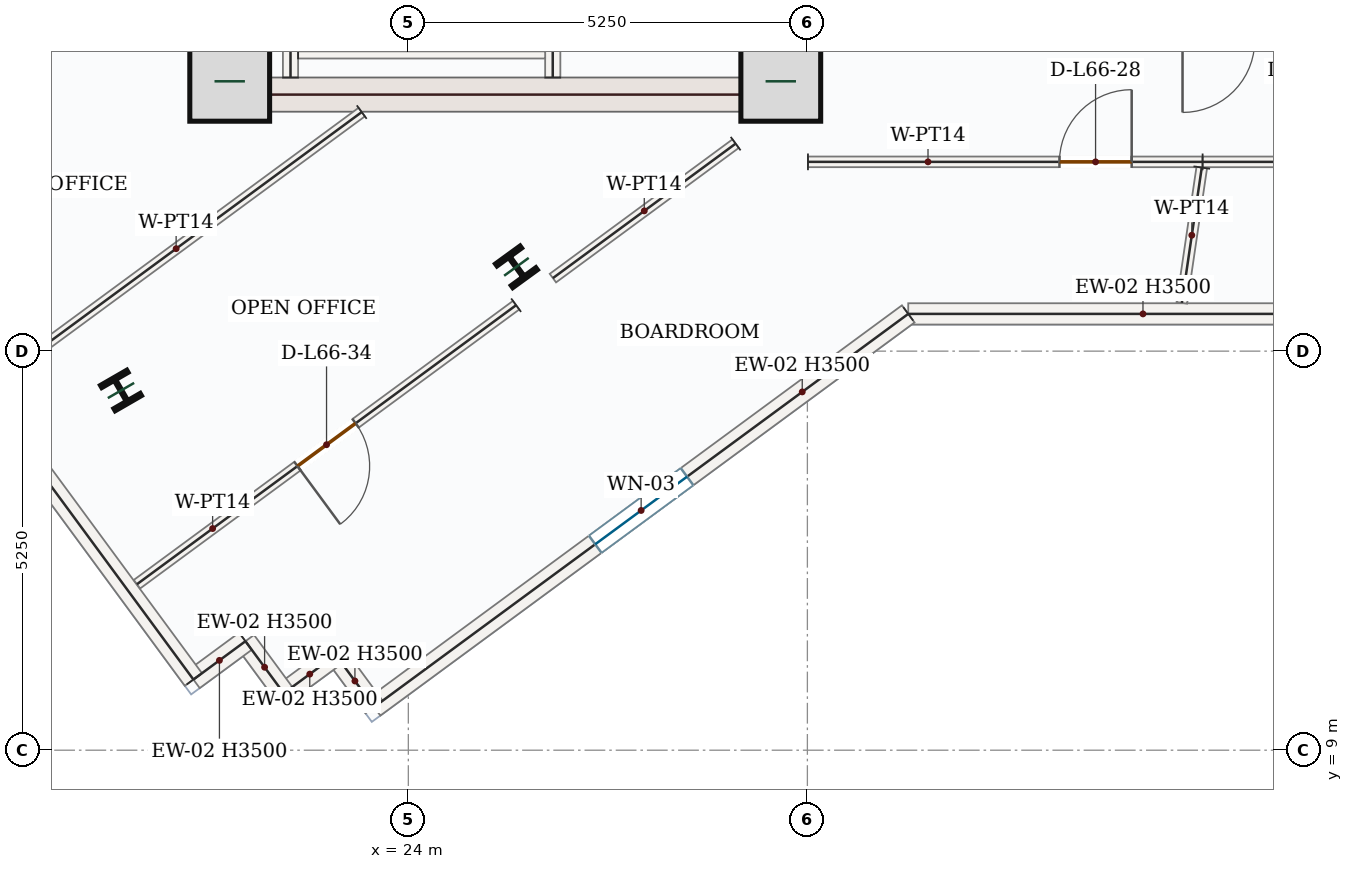
"""IFC4 building model, lengths in metres.
Left out: names, types, materials, properties, quantities, classifications, styles, units other than length and angle.
Written with IfcOpenShell. Run it as: python <this file> out.ifc"""

import sys

from ifc_helpers import new_model, si_unit, direction, frame, frame_2d, origin, origin_2d, place, context, subcontext, project, spatial, rectangle, i_section, extrude, source, transform, mapped, element, fill, save


model = new_model("IFC4")
c1 = context("Model", 3, precision=1e-05, world=origin(), true_north=direction((0.0, 1.0)))
c2 = subcontext(c1, "Body", "Model", "MODEL_VIEW")
j1 = project(units=[si_unit("LENGTHUNIT", "METRE"), si_unit("PLANEANGLEUNIT", "RADIAN")], contexts=[c1])
p1 = place(None, origin())
s1 = spatial("IfcSite", under=j1, at=p1, CompositionType="ELEMENT")
p2 = place(p1, origin())
s2 = spatial("IfcBuilding", under=s1, at=p2, CompositionType="ELEMENT")
p3 = place(p2, frame((0.0, 0.0, 276.6)))
s3 = spatial("IfcBuildingStorey", under=s2, at=p3, CompositionType="ELEMENT", Elevation=276.6)
m1 = source(origin(), c2, "Body", "SweptSolid", [
    extrude(rectangle(XDim=8.55, YDim=0.45, at=frame_2d((4.275, 0.0))), origin(), (0.0, 0.0, 1.0), 3.5),
])
p4 = place(p3, frame((21.475, 17.4, 0.0), z_axis=(0.0, 0.0, 1.0), x_axis=(0.0, 1.0, 0.0)))
e1 = element("IfcWall", 1, at=p4, inside=s3, PredefinedType="SHEAR", context=c2, shape_type="MappedRepresentation", body=[
    mapped(m1, transform((0.0, 0.0, 0.0), x_axis=(1.0, 0.0, 0.0), y_axis=(0.0, 1.0, 0.0), z_axis=(0.0, 0.0, 1.0), scale=1.0)),
])
p5 = place(p3, frame((29.025, 17.4, 0.0), z_axis=(0.0, 0.0, 1.0), x_axis=(0.0, 1.0, 0.0)))
e2 = element("IfcWall", 2, at=p5, inside=s3, PredefinedType="SHEAR", context=c2, shape_type="SweptSolid", body=[
    extrude(rectangle(XDim=8.55, YDim=0.45, at=frame_2d((4.275, 0.0))), origin(), (0.0, 0.0, 1.0), 3.5),
])
p6 = place(p5, frame((6.65, 0.0, 0.0)))
e3 = element("IfcOpeningElement", 3, at=p6, cuts=e2, PredefinedType="OPENING", context=c2, shape_type="SweptSolid", body=[
    extrude(rectangle(XDim=1.1, YDim=2.2, at=frame_2d((0.55, 1.1))), frame((0.0, 0.235, 0.0), z_axis=(0.0, -1.0, 0.0), x_axis=(1.0, 0.0, 0.0)), (0.0, 0.0, 1.0), 0.47),
])
p7 = place(p5, frame((2.7, 0.0, 0.0)))
e4 = element("IfcOpeningElement", 4, at=p7, cuts=e2, PredefinedType="OPENING", context=c2, shape_type="SweptSolid", body=[
    extrude(rectangle(XDim=0.88, YDim=2.1, at=frame_2d((0.44, 1.05))), frame((0.0, 0.235, 0.0), z_axis=(0.0, -1.0, 0.0), x_axis=(1.0, 0.0, 0.0)), (0.0, 0.0, 1.0), 0.47),
])
p8 = place(p5, frame((4.6, 0.0, 0.0)))
e5 = element("IfcOpeningElement", 5, at=p8, cuts=e2, PredefinedType="OPENING", context=c2, shape_type="SweptSolid", body=[
    extrude(rectangle(XDim=0.88, YDim=2.1, at=frame_2d((0.44, 1.05))), frame((0.0, 0.235, 0.0), z_axis=(0.0, -1.0, 0.0), x_axis=(1.0, 0.0, 0.0)), (0.0, 0.0, 1.0), 0.47),
])
m2 = source(origin(), c2, "Body", "SweptSolid", [
    extrude(rectangle(XDim=7.1, YDim=0.45, at=frame_2d((3.55, 0.0))), origin(), (0.0, 0.0, 1.0), 3.5),
])
p9 = place(p3, frame((21.7, 17.625, 0.0), z_axis=(0.0, 0.0, 1.0), x_axis=(1.0, 0.0, 0.0)))
e6 = element("IfcWall", 6, at=p9, inside=s3, PredefinedType="SHEAR", context=c2, shape_type="MappedRepresentation", body=[
    mapped(m2, transform((0.0, 0.0, 0.0), x_axis=(1.0, 0.0, 0.0), y_axis=(0.0, 1.0, 0.0), z_axis=(0.0, 0.0, 1.0), scale=1.0)),
])
m3 = source(origin(), c2, "Body", "SweptSolid", [
    extrude(rectangle(XDim=1.05, YDim=1.05, at=origin_2d()), origin(), (0.0, 0.0, 1.0), 3.75),
])
for number, where, z_axis, x_axis in (
    (7, (21.65, 17.8, 0.0), (0.0, 0.0, 1.0), (1.0, 0.0, 0.0)),
    (8, (28.9, 17.8, 0.0), (0.0, 0.0, 1.0), (1.0, 0.0, 0.0)),
):
    element("IfcColumn", number, at=place(p3, frame(where, z_axis=z_axis, x_axis=x_axis)), inside=s3, PredefinedType="COLUMN", context=c2, shape_type="MappedRepresentation", body=[
        mapped(m3, transform((0.0, 0.0, 0.0), x_axis=(1.0, 0.0, 0.0), y_axis=(0.0, 1.0, 0.0), z_axis=(0.0, 0.0, 1.0), scale=1.0)),
    ])
m4 = source(origin(), c2, "Body", "SweptSolid", [
    extrude(i_section(OverallWidth=0.399, OverallDepth=0.386, WebThickness=0.021, FlangeThickness=0.033, FilletRadius=0.018, at=origin_2d()), origin(), (0.0, 0.0, 1.0), 3.75),
])
for number, where, z_axis, x_axis in (
    (9, (25.422, 15.359, 0.0), (0.0, 0.0, 1.0), (0.809, 0.588, 0.0)),
    (10, (20.22, 13.732, 0.0), (0.0, 0.0, 1.0), (0.866, 0.5, 0.0)),
):
    element("IfcColumn", number, at=place(p3, frame(where, z_axis=z_axis, x_axis=x_axis)), inside=s3, PredefinedType="COLUMN", context=c2, shape_type="MappedRepresentation", body=[
        mapped(m4, transform((0.0, 0.0, 0.0), x_axis=(1.0, 0.0, 0.0), y_axis=(0.0, 1.0, 0.0), z_axis=(0.0, 0.0, 1.0), scale=1.0)),
    ])
m5 = source(origin(), c2, "Body", "SweptSolid", [
    extrude(rectangle(XDim=6.177, YDim=0.28, at=frame_2d((3.088, 0.0))), origin(), (0.0, 0.0, 1.0), 3.5),
])
p10 = place(p3, frame((36.753, 14.74, 0.0), z_axis=(0.0, 0.0, 1.0), x_axis=(-1.0, 0.0, 0.0)))
e11 = element("IfcWall", 11, at=p10, inside=s3, PredefinedType="SOLIDWALL", context=c2, shape_type="MappedRepresentation", body=[
    mapped(m5, transform((0.0, 0.0, 0.0), x_axis=(1.0, 0.0, 0.0), y_axis=(0.0, 1.0, 0.0), z_axis=(0.0, 0.0, 1.0), scale=1.0)),
])
p11 = place(p3, frame((30.577, 14.74, 0.0), z_axis=(0.0, 0.0, 1.0), x_axis=(-0.805403112922, -0.592727446383, 0.0)))
e12 = element("IfcWall", 12, at=p11, inside=s3, PredefinedType="SOLIDWALL", context=c2, shape_type="SweptSolid", body=[
    extrude(rectangle(XDim=8.726, YDim=0.28, at=frame_2d((4.363, 0.0))), origin(), (0.0, 0.0, 1.0), 3.5),
])
p12 = place(p11, frame((3.613, 0.0, 0.85)))
e13 = element("IfcOpeningElement", 13, at=p12, cuts=e12, PredefinedType="OPENING", context=c2, shape_type="SweptSolid", body=[
    extrude(rectangle(XDim=1.5, YDim=1.5, at=frame_2d((0.75, 0.75))), frame((0.0, 0.15, 0.0), z_axis=(0.0, -1.0, 0.0), x_axis=(1.0, 0.0, 0.0)), (0.0, 0.0, 1.0), 0.3),
])
m6 = source(origin(), c2, "Body", "SweptSolid", [
    extrude(rectangle(XDim=0.85, YDim=0.28, at=frame_2d((0.425, 0.0))), origin(), (0.0, 0.0, 1.0), 3.5),
])
p13 = place(p3, frame((23.549, 9.568, 0.0), z_axis=(0.0, 0.0, 1.0), x_axis=(-0.592807079659, 0.80534450163, 0.0)))
e14 = element("IfcWall", 14, at=p13, inside=s3, PredefinedType="SOLIDWALL", context=c2, shape_type="MappedRepresentation", body=[
    mapped(m6, transform((0.0, 0.0, 0.0), x_axis=(1.0, 0.0, 0.0), y_axis=(0.0, 1.0, 0.0), z_axis=(0.0, 0.0, 1.0), scale=1.0)),
])
m7 = source(origin(), c2, "Body", "SweptSolid", [
    extrude(rectangle(XDim=0.85, YDim=0.28, at=frame_2d((0.425, 0.0))), origin(), (0.0, 0.0, 1.0), 3.5),
])
for number, where, z_axis, x_axis in (
    (15, (23.045, 10.253, 0.0), (0.0, 0.0, 1.0), (-0.805, -0.593, 0.0)),
    (16, (22.361, 9.749, 0.0), (0.0, 0.0, 1.0), (-0.593, 0.805, 0.0)),
):
    element("IfcWall", number, at=place(p3, frame(where, z_axis=z_axis, x_axis=x_axis)), inside=s3, PredefinedType="SOLIDWALL", context=c2, shape_type="MappedRepresentation", body=[
        mapped(m7, transform((0.0, 0.0, 0.0), x_axis=(1.0, 0.0, 0.0), y_axis=(0.0, 1.0, 0.0), z_axis=(0.0, 0.0, 1.0), scale=1.0)),
    ])
p14 = place(p3, frame((21.857, 10.434, 0.0), z_axis=(0.0, 0.0, 1.0), x_axis=(-0.80534450163, -0.592807079659, 0.0)))
e17 = element("IfcWall", 17, at=p14, inside=s3, PredefinedType="SOLIDWALL", context=c2, shape_type="MappedRepresentation", body=[
    mapped(m6, transform((0.0, 0.0, 0.0), x_axis=(1.0, 0.0, 0.0), y_axis=(0.0, 1.0, 0.0), z_axis=(0.0, 0.0, 1.0), scale=1.0)),
])
m8 = source(origin(), c2, "Body", "SweptSolid", [
    extrude(rectangle(XDim=9.92, YDim=0.28, at=frame_2d((4.96, 0.0))), origin(), (0.0, 0.0, 1.0), 3.5),
])
p15 = place(p3, frame((21.173, 9.93, 0.0), z_axis=(0.0, 0.0, 1.0), x_axis=(-0.592722097771, 0.805407049146, 0.0)))
e18 = element("IfcWall", 18, at=p15, inside=s3, PredefinedType="SOLIDWALL", context=c2, shape_type="MappedRepresentation", body=[
    mapped(m8, transform((0.0, 0.0, 0.0), x_axis=(1.0, 0.0, 0.0), y_axis=(0.0, 1.0, 0.0), z_axis=(0.0, 0.0, 1.0), scale=1.0)),
])
m9 = source(origin(), c2, "Body", "SweptSolid", [
    extrude(rectangle(XDim=7.87, YDim=0.2, at=frame_2d((3.935, 0.0))), origin(), (0.0, 0.0, 1.0), 3.5),
])
p16 = place(p3, frame((22.45, 17.85, 0.0), z_axis=(0.0, 0.0, 1.0), x_axis=(0.0, 1.0, 0.0)))
e19 = element("IfcWall", 19, at=p16, inside=s3, PredefinedType="SOLIDWALL", context=c2, shape_type="MappedRepresentation", body=[
    mapped(m9, transform((0.0, 0.0, 0.0), x_axis=(1.0, 0.0, 0.0), y_axis=(0.0, 1.0, 0.0), z_axis=(0.0, 0.0, 1.0), scale=1.0)),
])
p17 = place(p3, frame((25.9, 17.85, 0.0), z_axis=(0.0, 0.0, 1.0), x_axis=(0.0, 1.0, 0.0)))
e20 = element("IfcWall", 20, at=p17, inside=s3, PredefinedType="SOLIDWALL", context=c2, shape_type="SweptSolid", body=[
    extrude(rectangle(XDim=8.0, YDim=0.2, at=frame_2d((4.0, 0.0))), origin(), (0.0, 0.0, 1.0), 3.5),
])
p18 = place(p17, frame((6.2, 0.0, 0.0)))
e21 = element("IfcOpeningElement", 21, at=p18, cuts=e20, PredefinedType="OPENING", context=c2, shape_type="SweptSolid", body=[
    extrude(rectangle(XDim=1.0, YDim=2.15, at=frame_2d((0.5, 1.075))), frame((0.0, 0.11, 0.0), z_axis=(0.0, -1.0, 0.0), x_axis=(1.0, 0.0, 0.0)), (0.0, 0.0, 1.0), 0.22),
])
p19 = place(p17, frame((0.6, 0.0, 0.0)))
e22 = element("IfcOpeningElement", 22, at=p19, cuts=e20, PredefinedType="OPENING", context=c2, shape_type="SweptSolid", body=[
    extrude(rectangle(XDim=0.88, YDim=2.1, at=frame_2d((0.44, 1.05))), frame((0.0, 0.11, 0.0), z_axis=(0.0, -1.0, 0.0), x_axis=(1.0, 0.0, 0.0)), (0.0, 0.0, 1.0), 0.22),
])
m10 = source(origin(), c2, "Body", "SweptSolid", [
    extrude(rectangle(XDim=3.25, YDim=0.2, at=frame_2d((1.625, 0.0))), origin(), (0.0, 0.0, 1.0), 3.5),
])
p20 = place(p3, frame((22.55, 18.2, 0.0), z_axis=(0.0, 0.0, 1.0), x_axis=(1.0, 0.0, 0.0)))
e23 = element("IfcWall", 23, at=p20, inside=s3, PredefinedType="SOLIDWALL", context=c2, shape_type="MappedRepresentation", body=[
    mapped(m10, transform((0.0, 0.0, 0.0), x_axis=(1.0, 0.0, 0.0), y_axis=(0.0, 1.0, 0.0), z_axis=(0.0, 0.0, 1.0), scale=1.0)),
])
m11 = source(origin(), c2, "Body", "SweptSolid", [
    extrude(rectangle(XDim=6.063, YDim=0.14, at=frame_2d((3.032, 0.0))), origin(), (0.0, 0.0, 1.0), 3.5),
])
p21 = place(p3, frame((23.387, 17.395, 0.0), z_axis=(0.0, 0.0, 1.0), x_axis=(-0.805422045282, -0.59270172007, 0.0)))
e24 = element("IfcWall", 24, at=p21, inside=s3, PredefinedType="PARTITIONING", context=c2, shape_type="MappedRepresentation", body=[
    mapped(m11, transform((0.0, 0.0, 0.0), x_axis=(1.0, 0.0, 0.0), y_axis=(0.0, 1.0, 0.0), z_axis=(0.0, 0.0, 1.0), scale=1.0)),
])
p22 = place(p3, frame((16.589, 16.403, 0.0), z_axis=(0.0, 0.0, 1.0), x_axis=(0.80540492624, 0.592724982423, 0.0)))
e25 = element("IfcWall", 25, at=p22, inside=s3, PredefinedType="PARTITIONING", context=c2, shape_type="SweptSolid", body=[
    extrude(rectangle(XDim=5.781, YDim=0.14, at=frame_2d((2.891, 0.0))), origin(), (0.0, 0.0, 1.0), 3.5),
])
p23 = place(p22, frame((3.14, 0.0, 0.0)))
e26 = element("IfcOpeningElement", 26, at=p23, cuts=e25, PredefinedType="OPENING", context=c2, shape_type="SweptSolid", body=[
    extrude(rectangle(XDim=0.95, YDim=2.15, at=frame_2d((0.475, 1.075))), frame((0.0, 0.08, 0.0), z_axis=(0.0, -1.0, 0.0), x_axis=(1.0, 0.0, 0.0)), (0.0, 0.0, 1.0), 0.16),
])
m12 = source(origin(), c2, "Body", "SweptSolid", [
    extrude(rectangle(XDim=2.985, YDim=0.14, at=frame_2d((1.492, 0.0))), origin(), (0.0, 0.0, 1.0), 3.5),
])
p24 = place(p3, frame((28.306, 16.98, 0.0), z_axis=(0.0, 0.0, 1.0), x_axis=(-0.80539491033, -0.592738591973, 0.0)))
e27 = element("IfcWall", 27, at=p24, inside=s3, PredefinedType="PARTITIONING", context=c2, shape_type="MappedRepresentation", body=[
    mapped(m12, transform((0.0, 0.0, 0.0), x_axis=(1.0, 0.0, 0.0), y_axis=(0.0, 1.0, 0.0), z_axis=(0.0, 0.0, 1.0), scale=1.0)),
])
p25 = place(p3, frame((25.418, 14.854, 0.0), z_axis=(0.0, 0.0, 1.0), x_axis=(-0.805402487917, -0.592728295645, 0.0)))
e28 = element("IfcWall", 28, at=p25, inside=s3, PredefinedType="PARTITIONING", context=c2, shape_type="SweptSolid", body=[
    extrude(rectangle(XDim=6.193, YDim=0.14, at=frame_2d((3.097, 0.0))), origin(), (0.0, 0.0, 1.0), 3.5),
])
p26 = place(p25, frame((2.622, 0.0, 0.0)))
e29 = element("IfcOpeningElement", 29, at=p26, cuts=e28, PredefinedType="OPENING", context=c2, shape_type="SweptSolid", body=[
    extrude(rectangle(XDim=0.95, YDim=2.15, at=frame_2d((0.475, 1.075))), frame((0.0, 0.08, 0.0), z_axis=(0.0, -1.0, 0.0), x_axis=(1.0, 0.0, 0.0)), (0.0, 0.0, 1.0), 0.16),
])
p27 = place(p3, frame((29.258, 16.74, 0.0), z_axis=(0.0, 0.0, 1.0), x_axis=(0.999999998895, -4.7021207e-05, 0.0)))
e30 = element("IfcWall", 30, at=p27, inside=s3, PredefinedType="PARTITIONING", context=c2, shape_type="SweptSolid", body=[
    extrude(rectangle(XDim=5.192, YDim=0.14, at=frame_2d((2.596, 0.0))), origin(), (0.0, 0.0, 1.0), 3.5),
])
p28 = place(p27, frame((3.309, 0.0, 0.0)))
e31 = element("IfcOpeningElement", 31, at=p28, cuts=e30, PredefinedType="OPENING", context=c2, shape_type="SweptSolid", body=[
    extrude(rectangle(XDim=0.95, YDim=2.15, at=frame_2d((0.475, 1.075))), frame((0.0, 0.08, 0.0), z_axis=(0.0, -1.0, 0.0), x_axis=(1.0, 0.0, 0.0)), (0.0, 0.0, 1.0), 0.16),
])
m13 = source(origin(), c2, "Body", "SweptSolid", [
    extrude(rectangle(XDim=1.799, YDim=0.14, at=frame_2d((0.9, 0.0))), origin(), (0.0, 0.0, 1.0), 3.5),
])
p29 = place(p3, frame((34.439, 16.665, 0.0), z_axis=(0.0, 0.0, 1.0), x_axis=(-0.14573227875, -0.989324063657, 0.0)))
e32 = element("IfcWall", 32, at=p29, inside=s3, PredefinedType="PARTITIONING", context=c2, shape_type="MappedRepresentation", body=[
    mapped(m13, transform((0.0, 0.0, 0.0), x_axis=(1.0, 0.0, 0.0), y_axis=(0.0, 1.0, 0.0), z_axis=(0.0, 0.0, 1.0), scale=1.0)),
])
p30 = place(p3, frame((34.45, 16.74, 0.0), z_axis=(0.0, 0.0, 1.0), x_axis=(1.0, 0.0, 0.0)))
e33 = element("IfcWall", 33, at=p30, inside=s3, PredefinedType="PARTITIONING", context=c2, shape_type="SweptSolid", body=[
    extrude(rectangle(XDim=5.388, YDim=0.14, at=frame_2d((2.694, 0.0))), origin(), (0.0, 0.0, 1.0), 3.5),
])
p31 = place(p30, frame((0.976, 0.0, 0.0)))
e34 = element("IfcOpeningElement", 34, at=p31, cuts=e33, PredefinedType="OPENING", context=c2, shape_type="SweptSolid", body=[
    extrude(rectangle(XDim=0.95, YDim=2.15, at=frame_2d((0.475, 1.075))), frame((0.0, 0.08, 0.0), z_axis=(0.0, -1.0, 0.0), x_axis=(1.0, 0.0, 0.0)), (0.0, 0.0, 1.0), 0.16),
])
m14 = source(origin(), c2, "Body", "SweptSolid", [
    extrude(rectangle(XDim=1.5, YDim=1.5, at=frame_2d((0.75, 0.75))), frame((0.0, 0.03, 0.0), z_axis=(0.0, -1.0, 0.0), x_axis=(1.0, 0.0, 0.0)), (0.0, 0.0, 1.0), 0.06),
])
p32 = place(p12, origin())
e35 = element("IfcWindow", 35, at=p32, inside=s3, PartitioningType="SINGLE_PANEL", PredefinedType="WINDOW", context=c2, shape_type="MappedRepresentation", body=[
    mapped(m14, transform((0.0, 0.0, 0.0), x_axis=(1.0, 0.0, 0.0), y_axis=(0.0, 1.0, 0.0), z_axis=(0.0, 0.0, 1.0), scale=1.0)),
])
fill(e13, e35)
m15 = source(origin(), c2, "Body", "SweptSolid", [
    extrude(rectangle(XDim=0.95, YDim=2.15, at=frame_2d((0.475, 1.075))), frame((0.0, 0.025, 0.0), z_axis=(0.0, -1.0, 0.0), x_axis=(1.0, 0.0, 0.0)), (0.0, 0.0, 1.0), 0.05),
])
p33 = place(p28, origin())
e36 = element("IfcDoor", 36, at=p33, inside=s3, OperationType="SINGLE_SWING_RIGHT", PredefinedType="DOOR", context=c2, shape_type="MappedRepresentation", body=[
    mapped(m15, transform((0.0, 0.0, 0.0), x_axis=(1.0, 0.0, 0.0), y_axis=(0.0, 1.0, 0.0), z_axis=(0.0, 0.0, 1.0), scale=1.0)),
])
fill(e31, e36)
p34 = place(p26, origin())
e37 = element("IfcDoor", 37, at=p34, inside=s3, OperationType="SINGLE_SWING_RIGHT", PredefinedType="DOOR", context=c2, shape_type="MappedRepresentation", body=[
    mapped(m15, transform((0.0, 0.0, 0.0), x_axis=(1.0, 0.0, 0.0), y_axis=(0.0, 1.0, 0.0), z_axis=(0.0, 0.0, 1.0), scale=1.0)),
])
fill(e29, e37)
save(model, sys.argv[1])
